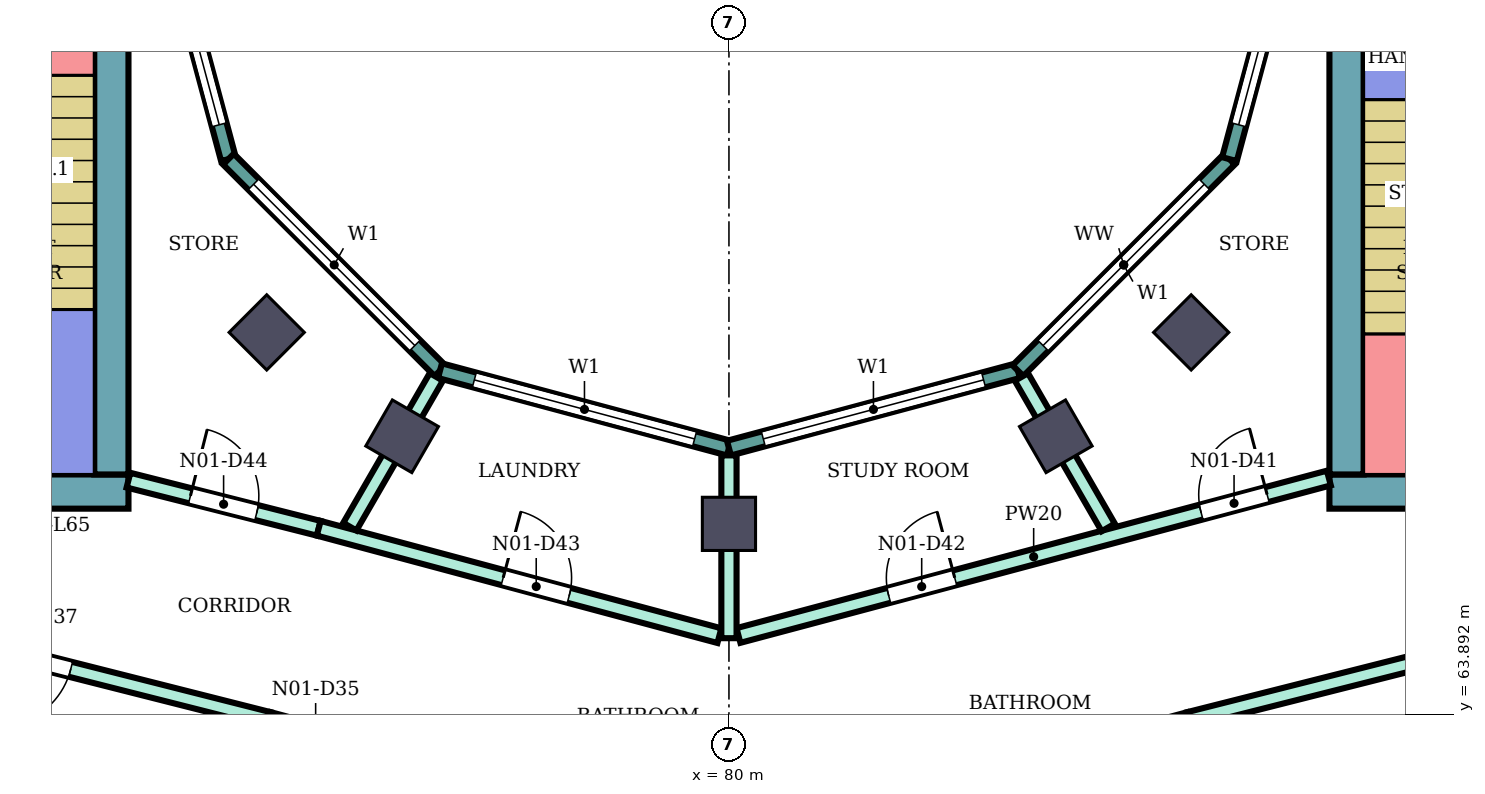
"""IFC4 building model, lengths in metres.
Left out: names, types, materials, properties, quantities, classifications, styles, units other than length and angle.
Written with IfcOpenShell. Run it as: python <this file> out.ifc"""

import sys

from ifc_helpers import new_model, si_unit, direction, frame, frame_2d, origin, origin_2d, place, context, subcontext, project, spatial, rectangle, extrude, element, fill, save


model = new_model("IFC4")
c1 = context("Model", 3, precision=1e-05, world=origin(), true_north=direction((0.0, 1.0)))
c2 = subcontext(c1, "Body", "Model", "MODEL_VIEW")
j1 = project(units=[si_unit("LENGTHUNIT", "METRE"), si_unit("PLANEANGLEUNIT", "RADIAN")], contexts=[c1])
p1 = place(None, origin())
s1 = spatial("IfcSite", under=j1, at=p1, CompositionType="ELEMENT")
p2 = place(p1, origin())
s2 = spatial("IfcBuilding", under=s1, at=p2, CompositionType="ELEMENT")
p3 = place(p2, frame((0.0, 0.0, 284.1)))
s3 = spatial("IfcBuildingStorey", under=s2, at=p3, CompositionType="ELEMENT", Elevation=284.1)
for number, where, z_axis, x_axis in (
    (1, (73.919, 68.919, 0.0), (0.0, 0.0, 1.0), (-0.707, -0.707, 0.0)),
    (2, (75.7, 67.552, 0.0), (0.0, 0.0, 1.0), (-0.5, -0.866, 0.0)),
    (3, (80.0, 66.4, 0.0), (0.0, 0.0, 1.0), (0.0, -1.0, 0.0)),
    (4, (84.3, 67.552, 0.0), (0.0, 0.0, 1.0), (0.5, -0.866, 0.0)),
    (5, (86.081, 68.919, 0.0), (0.0, 0.0, 1.0), (0.707, -0.707, 0.0)),
):
    element("IfcColumn", number, at=place(p3, frame(where, z_axis=z_axis, x_axis=x_axis)), inside=s3, PredefinedType="COLUMN", context=c2, shape_type="SweptSolid", body=[
        extrude(rectangle(XDim=0.7, YDim=0.7, at=origin_2d()), origin(), (0.0, 0.0, 1.0), 4.2),
    ])
p4 = place(p3, frame((87.9, 66.825, 0.0), z_axis=(0.0, 0.0, 1.0), x_axis=(1.0, 0.0, 0.0)))
e6 = element("IfcWall", 6, at=p4, inside=s3, PredefinedType="SHEAR", context=c2, shape_type="SweptSolid", body=[
    extrude(rectangle(XDim=13.55, YDim=0.45, at=frame_2d((6.775, 0.0))), origin(), (0.0, 0.0, 1.0), 3.88),
])
p5 = place(p4, frame((4.2, 0.0, 0.0)))
e7 = element("IfcOpeningElement", 7, at=p5, cuts=e6, PredefinedType="OPENING", context=c2, shape_type="SweptSolid", body=[
    extrude(rectangle(XDim=2.4, YDim=2.4, at=frame_2d((1.2, 1.2))), frame((0.0, 0.235, 0.0), z_axis=(0.0, -1.0, 0.0), x_axis=(1.0, 0.0, 0.0)), (0.0, 0.0, 1.0), 0.47),
])
p6 = place(p3, frame((88.125, 67.05, 0.0), z_axis=(0.0, 0.0, 1.0), x_axis=(0.0, 1.0, 0.0)))
e8 = element("IfcWall", 8, at=p6, inside=s3, PredefinedType="SHEAR", context=c2, shape_type="SweptSolid", body=[
    extrude(rectangle(XDim=7.95, YDim=0.45, at=frame_2d((3.975, 0.0))), origin(), (0.0, 0.0, 1.0), 3.88),
])
p7 = place(p3, frame((72.1, 66.825, 0.0), z_axis=(0.0, 0.0, 1.0), x_axis=(-1.0, 0.0, 0.0)))
e9 = element("IfcWall", 9, at=p7, inside=s3, PredefinedType="SHEAR", context=c2, shape_type="SweptSolid", body=[
    extrude(rectangle(XDim=13.55, YDim=0.45, at=frame_2d((6.775, 0.0))), origin(), (0.0, 0.0, 1.0), 3.88),
])
p8 = place(p7, frame((4.2, 0.0, 0.0)))
e10 = element("IfcOpeningElement", 10, at=p8, cuts=e9, PredefinedType="OPENING", context=c2, shape_type="SweptSolid", body=[
    extrude(rectangle(XDim=2.4, YDim=2.4, at=frame_2d((1.2, 1.2))), frame((0.0, 0.235, 0.0), z_axis=(0.0, -1.0, 0.0), x_axis=(1.0, 0.0, 0.0)), (0.0, 0.0, 1.0), 0.47),
])
p9 = place(p3, frame((71.875, 75.0, 0.0), z_axis=(0.0, 0.0, 1.0), x_axis=(0.0, -1.0, 0.0)))
e11 = element("IfcWall", 11, at=p9, inside=s3, PredefinedType="SHEAR", context=c2, shape_type="SweptSolid", body=[
    extrude(rectangle(XDim=7.95, YDim=0.45, at=frame_2d((3.975, 0.0))), origin(), (0.0, 0.0, 1.0), 3.88),
])
p10 = place(p3, frame((72.396, 75.0, 0.0), z_axis=(0.0, 0.0, 1.0), x_axis=(0.258789828301, -0.965933654434, 0.0)))
e12 = element("IfcWall", 12, at=p10, inside=s3, PredefinedType="NOTDEFINED", context=c2, shape_type="SweptSolid", body=[
    extrude(rectangle(XDim=3.936, YDim=0.2, at=frame_2d((1.968, 0.0))), origin(), (0.0, 0.0, 1.0), 4.2),
])
p11 = place(p10, frame((0.468, 0.0, 0.9)))
e13 = element("IfcOpeningElement", 13, at=p11, cuts=e12, PredefinedType="OPENING", context=c2, shape_type="SweptSolid", body=[
    extrude(rectangle(XDim=3.0, YDim=2.3, at=frame_2d((1.5, 1.15))), frame((0.0, 0.11, 0.0), z_axis=(0.0, -1.0, 0.0), x_axis=(1.0, 0.0, 0.0)), (0.0, 0.0, 1.0), 0.22),
])
p12 = place(p3, frame((73.415, 71.198, 0.0), z_axis=(0.0, 0.0, 1.0), x_axis=(0.707106781187, -0.707106781187, 0.0)))
e14 = element("IfcWall", 14, at=p12, inside=s3, PredefinedType="NOTDEFINED", context=c2, shape_type="SweptSolid", body=[
    extrude(rectangle(XDim=3.936, YDim=0.2, at=frame_2d((1.968, 0.0))), origin(), (0.0, 0.0, 1.0), 4.2),
])
p13 = place(p12, frame((0.468, 0.0, 0.9)))
e15 = element("IfcOpeningElement", 15, at=p13, cuts=e14, PredefinedType="OPENING", context=c2, shape_type="SweptSolid", body=[
    extrude(rectangle(XDim=3.0, YDim=2.3, at=frame_2d((1.5, 1.15))), frame((0.0, 0.11, 0.0), z_axis=(0.0, -1.0, 0.0), x_axis=(1.0, 0.0, 0.0)), (0.0, 0.0, 1.0), 0.22),
])
p14 = place(p3, frame((76.198, 68.415, 0.0), z_axis=(0.0, 0.0, 1.0), x_axis=(0.965933654434, -0.258789828301, 0.0)))
e16 = element("IfcWall", 16, at=p14, inside=s3, PredefinedType="NOTDEFINED", context=c2, shape_type="SweptSolid", body=[
    extrude(rectangle(XDim=3.936, YDim=0.2, at=frame_2d((1.968, 0.0))), origin(), (0.0, 0.0, 1.0), 4.2),
])
p15 = place(p14, frame((0.468, 0.0, 0.9)))
e17 = element("IfcOpeningElement", 17, at=p15, cuts=e16, PredefinedType="OPENING", context=c2, shape_type="SweptSolid", body=[
    extrude(rectangle(XDim=3.0, YDim=2.3, at=frame_2d((1.5, 1.15))), frame((0.0, 0.11, 0.0), z_axis=(0.0, -1.0, 0.0), x_axis=(1.0, 0.0, 0.0)), (0.0, 0.0, 1.0), 0.22),
])
p16 = place(p3, frame((80.0, 67.396, 0.0), z_axis=(0.0, 0.0, 1.0), x_axis=(0.965933654434, 0.258789828301, 0.0)))
e18 = element("IfcWall", 18, at=p16, inside=s3, PredefinedType="NOTDEFINED", context=c2, shape_type="SweptSolid", body=[
    extrude(rectangle(XDim=3.936, YDim=0.2, at=frame_2d((1.968, 0.0))), origin(), (0.0, 0.0, 1.0), 4.2),
])
p17 = place(p16, frame((0.468, 0.0, 0.9)))
e19 = element("IfcOpeningElement", 19, at=p17, cuts=e18, PredefinedType="OPENING", context=c2, shape_type="SweptSolid", body=[
    extrude(rectangle(XDim=3.0, YDim=2.3, at=frame_2d((1.5, 1.15))), frame((0.0, 0.11, 0.0), z_axis=(0.0, -1.0, 0.0), x_axis=(1.0, 0.0, 0.0)), (0.0, 0.0, 1.0), 0.22),
])
p18 = place(p3, frame((83.802, 68.415, 0.0), z_axis=(0.0, 0.0, 1.0), x_axis=(0.707106781187, 0.707106781187, 0.0)))
e20 = element("IfcWall", 20, at=p18, inside=s3, PredefinedType="NOTDEFINED", context=c2, shape_type="SweptSolid", body=[
    extrude(rectangle(XDim=3.936, YDim=0.2, at=frame_2d((1.968, 0.0))), origin(), (0.0, 0.0, 1.0), 4.2),
])
p19 = place(p18, frame((0.468, 0.0, 0.9)))
e21 = element("IfcOpeningElement", 21, at=p19, cuts=e20, PredefinedType="OPENING", context=c2, shape_type="SweptSolid", body=[
    extrude(rectangle(XDim=3.0, YDim=2.3, at=frame_2d((1.5, 1.15))), frame((0.0, 0.11, 0.0), z_axis=(0.0, -1.0, 0.0), x_axis=(1.0, 0.0, 0.0)), (0.0, 0.0, 1.0), 0.22),
])
p20 = place(p3, frame((86.585, 71.198, 0.0), z_axis=(0.0, 0.0, 1.0), x_axis=(0.258789828301, 0.965933654434, 0.0)))
e22 = element("IfcWall", 22, at=p20, inside=s3, PredefinedType="NOTDEFINED", context=c2, shape_type="SweptSolid", body=[
    extrude(rectangle(XDim=3.936, YDim=0.2, at=frame_2d((1.968, 0.0))), origin(), (0.0, 0.0, 1.0), 4.2),
])
p21 = place(p20, frame((0.468, 0.0, 0.9)))
e23 = element("IfcOpeningElement", 23, at=p21, cuts=e22, PredefinedType="OPENING", context=c2, shape_type="SweptSolid", body=[
    extrude(rectangle(XDim=3.0, YDim=2.3, at=frame_2d((1.5, 1.15))), frame((0.0, 0.11, 0.0), z_axis=(0.0, -1.0, 0.0), x_axis=(1.0, 0.0, 0.0)), (0.0, 0.0, 1.0), 0.22),
])
p22 = place(p3, frame((68.2, 65.28, 0.0), z_axis=(0.0, 0.0, 1.0), x_axis=(0.969440802773, -0.24532535523, 0.0)))
e24 = element("IfcWall", 24, at=p22, inside=s3, PredefinedType="PARTITIONING", context=c2, shape_type="SweptSolid", body=[
    extrude(rectangle(XDim=5.928, YDim=0.2, at=frame_2d((2.964, 0.0))), origin(), (0.0, 0.0, 1.0), 3.75),
])
p23 = place(p22, frame((2.239, 0.0, 0.0)))
e25 = element("IfcOpeningElement", 25, at=p23, cuts=e24, PredefinedType="OPENING", context=c2, shape_type="SweptSolid", body=[
    extrude(rectangle(XDim=1.0, YDim=2.1, at=frame_2d((0.5, 1.05))), frame((0.0, 0.11, 0.0), z_axis=(0.0, -1.0, 0.0), x_axis=(1.0, 0.0, 0.0)), (0.0, 0.0, 1.0), 0.22),
])
p24 = place(p3, frame((72.1, 66.975, 0.0), z_axis=(0.0, 0.0, 1.0), x_axis=(0.969471314457, -0.245204752086, 0.0)))
e26 = element("IfcWall", 26, at=p24, inside=s3, PredefinedType="PARTITIONING", context=c2, shape_type="SweptSolid", body=[
    extrude(rectangle(XDim=2.582, YDim=0.2, at=frame_2d((1.291, 0.0))), origin(), (0.0, 0.0, 1.0), 3.75),
])
p25 = place(p24, frame((0.841, 0.0, 0.0)))
e27 = element("IfcOpeningElement", 27, at=p25, cuts=e26, PredefinedType="OPENING", context=c2, shape_type="SweptSolid", body=[
    extrude(rectangle(XDim=0.9, YDim=2.1, at=frame_2d((0.45, 1.05))), frame((0.0, 0.11, 0.0), z_axis=(0.0, -1.0, 0.0), x_axis=(1.0, 0.0, 0.0)), (0.0, 0.0, 1.0), 0.22),
])
p26 = place(p3, frame((73.947, 63.826, 0.0), z_axis=(0.0, 0.0, 1.0), x_axis=(0.965872508768, -0.25901794688, 0.0)))
e28 = element("IfcWall", 28, at=p26, inside=s3, PredefinedType="PARTITIONING", context=c2, shape_type="SweptSolid", body=[
    extrude(rectangle(XDim=6.177, YDim=0.2, at=frame_2d((3.088, 0.0))), origin(), (0.0, 0.0, 1.0), 3.75),
])
p27 = place(p26, frame((4.885, 0.0, 0.0)))
e29 = element("IfcOpeningElement", 29, at=p27, cuts=e28, PredefinedType="OPENING", context=c2, shape_type="SweptSolid", body=[
    extrude(rectangle(XDim=1.0, YDim=2.1, at=frame_2d((0.5, 1.05))), frame((0.0, 0.11, 0.0), z_axis=(0.0, -1.0, 0.0), x_axis=(1.0, 0.0, 0.0)), (0.0, 0.0, 1.0), 0.22),
])
p28 = place(p26, frame((0.137, 0.0, 0.0)))
e30 = element("IfcOpeningElement", 30, at=p28, cuts=e28, PredefinedType="OPENING", context=c2, shape_type="SweptSolid", body=[
    extrude(rectangle(XDim=1.0, YDim=2.1, at=frame_2d((0.5, 1.05))), frame((0.0, 0.11, 0.0), z_axis=(0.0, -1.0, 0.0), x_axis=(1.0, 0.0, 0.0)), (0.0, 0.0, 1.0), 0.22),
])
p29 = place(p3, frame((74.603, 66.342, 0.0), z_axis=(0.0, 0.0, 1.0), x_axis=(0.965920893652, -0.258837453254, 0.0)))
e31 = element("IfcWall", 31, at=p29, inside=s3, PredefinedType="PARTITIONING", context=c2, shape_type="SweptSolid", body=[
    extrude(rectangle(XDim=5.458, YDim=0.2, at=frame_2d((2.729, 0.0))), origin(), (0.0, 0.0, 1.0), 3.75),
])
p30 = place(p29, frame((2.512, 0.0, 0.0)))
e32 = element("IfcOpeningElement", 32, at=p30, cuts=e31, PredefinedType="OPENING", context=c2, shape_type="SweptSolid", body=[
    extrude(rectangle(XDim=0.9, YDim=2.1, at=frame_2d((0.45, 1.05))), frame((0.0, 0.11, 0.0), z_axis=(0.0, -1.0, 0.0), x_axis=(1.0, 0.0, 0.0)), (0.0, 0.0, 1.0), 0.22),
])
p31 = place(p3, frame((75.012, 66.363, 0.0), z_axis=(0.0, 0.0, 1.0), x_axis=(0.500097042406, 0.865969369075, 0.0)))
e33 = element("IfcWall", 33, at=p31, inside=s3, PredefinedType="PARTITIONING", context=c2, shape_type="SweptSolid", body=[
    extrude(rectangle(XDim=2.275, YDim=0.2, at=frame_2d((1.138, 0.0))), origin(), (0.0, 0.0, 1.0), 3.75),
])
p32 = place(p3, frame((80.125, 64.932, 0.0), z_axis=(0.0, 0.0, 1.0), x_axis=(0.966236955806, 0.257655089674, 0.0)))
e34 = element("IfcWall", 34, at=p32, inside=s3, PredefinedType="PARTITIONING", context=c2, shape_type="SweptSolid", body=[
    extrude(rectangle(XDim=8.039, YDim=0.2, at=frame_2d((4.02, 0.0))), origin(), (0.0, 0.0, 1.0), 3.75),
])
p33 = place(p32, frame((6.298, 0.0, 0.0)))
e35 = element("IfcOpeningElement", 35, at=p33, cuts=e34, PredefinedType="OPENING", context=c2, shape_type="SweptSolid", body=[
    extrude(rectangle(XDim=0.9, YDim=2.1, at=frame_2d((0.45, 1.05))), frame((0.0, 0.11, 0.0), z_axis=(0.0, -1.0, 0.0), x_axis=(1.0, 0.0, 0.0)), (0.0, 0.0, 1.0), 0.22),
])
p34 = place(p32, frame((2.045, 0.0, 0.0)))
e36 = element("IfcOpeningElement", 36, at=p34, cuts=e34, PredefinedType="OPENING", context=c2, shape_type="SweptSolid", body=[
    extrude(rectangle(XDim=0.9, YDim=2.1, at=frame_2d((0.45, 1.05))), frame((0.0, 0.11, 0.0), z_axis=(0.0, -1.0, 0.0), x_axis=(1.0, 0.0, 0.0)), (0.0, 0.0, 1.0), 0.22),
])
p35 = place(p3, frame((80.0, 62.204, 0.0), z_axis=(0.0, 0.0, 1.0), x_axis=(0.965960221635, 0.258690645788, 0.0)))
e37 = element("IfcWall", 37, at=p35, inside=s3, PredefinedType="PARTITIONING", context=c2, shape_type="SweptSolid", body=[
    extrude(rectangle(XDim=6.267, YDim=0.2, at=frame_2d((3.133, 0.0))), origin(), (0.0, 0.0, 1.0), 3.75),
])
p36 = place(p35, frame((0.382, 0.0, 0.0)))
e38 = element("IfcOpeningElement", 38, at=p36, cuts=e37, PredefinedType="OPENING", context=c2, shape_type="SweptSolid", body=[
    extrude(rectangle(XDim=1.0, YDim=2.1, at=frame_2d((0.5, 1.05))), frame((0.0, 0.11, 0.0), z_axis=(0.0, -1.0, 0.0), x_axis=(1.0, 0.0, 0.0)), (0.0, 0.0, 1.0), 0.22),
])
p37 = place(p3, frame((80.0, 64.896, 0.0), z_axis=(0.0, 0.0, 1.0), x_axis=(0.0, 1.0, 0.0)))
e39 = element("IfcWall", 39, at=p37, inside=s3, PredefinedType="PARTITIONING", context=c2, shape_type="SweptSolid", body=[
    extrude(rectangle(XDim=2.405, YDim=0.2, at=frame_2d((1.203, 0.0))), origin(), (0.0, 0.0, 1.0), 3.75),
])
p38 = place(p3, frame((83.848, 68.332, 0.0), z_axis=(0.0, 0.0, 1.0), x_axis=(0.499953638813, -0.866052168773, 0.0)))
e40 = element("IfcWall", 40, at=p38, inside=s3, PredefinedType="PARTITIONING", context=c2, shape_type="SweptSolid", body=[
    extrude(rectangle(XDim=2.285, YDim=0.2, at=frame_2d((1.143, 0.0))), origin(), (0.0, 0.0, 1.0), 3.75),
])
p39 = place(p3, frame((86.053, 63.826, 0.0), z_axis=(0.0, 0.0, 1.0), x_axis=(0.969490004987, 0.245130843083, 0.0)))
e41 = element("IfcWall", 41, at=p39, inside=s3, PredefinedType="PARTITIONING", context=c2, shape_type="SweptSolid", body=[
    extrude(rectangle(XDim=5.908, YDim=0.2, at=frame_2d((2.954, 0.0))), origin(), (0.0, 0.0, 1.0), 3.75),
])
p40 = place(p11, origin())
e42 = element("IfcWindow", 42, at=p40, inside=s3, PartitioningType="SINGLE_PANEL", PredefinedType="WINDOW", context=c2, shape_type="SweptSolid", body=[
    extrude(rectangle(XDim=3.0, YDim=2.3, at=frame_2d((1.5, 1.15))), frame((0.0, 0.03, 0.0), z_axis=(0.0, -1.0, 0.0), x_axis=(1.0, 0.0, 0.0)), (0.0, 0.0, 1.0), 0.06),
])
fill(e13, e42)
p41 = place(p13, origin())
e43 = element("IfcWindow", 43, at=p41, inside=s3, PartitioningType="SINGLE_PANEL", PredefinedType="WINDOW", context=c2, shape_type="SweptSolid", body=[
    extrude(rectangle(XDim=3.0, YDim=2.3, at=frame_2d((1.5, 1.15))), frame((0.0, 0.03, 0.0), z_axis=(0.0, -1.0, 0.0), x_axis=(1.0, 0.0, 0.0)), (0.0, 0.0, 1.0), 0.06),
])
fill(e15, e43)
p42 = place(p15, origin())
e44 = element("IfcWindow", 44, at=p42, inside=s3, PartitioningType="SINGLE_PANEL", PredefinedType="WINDOW", context=c2, shape_type="SweptSolid", body=[
    extrude(rectangle(XDim=3.0, YDim=2.3, at=frame_2d((1.5, 1.15))), frame((0.0, 0.03, 0.0), z_axis=(0.0, -1.0, 0.0), x_axis=(1.0, 0.0, 0.0)), (0.0, 0.0, 1.0), 0.06),
])
fill(e17, e44)
p43 = place(p17, origin())
e45 = element("IfcWindow", 45, at=p43, inside=s3, PartitioningType="SINGLE_PANEL", PredefinedType="WINDOW", context=c2, shape_type="SweptSolid", body=[
    extrude(rectangle(XDim=3.0, YDim=2.3, at=frame_2d((1.5, 1.15))), frame((0.0, 0.03, 0.0), z_axis=(0.0, -1.0, 0.0), x_axis=(1.0, 0.0, 0.0)), (0.0, 0.0, 1.0), 0.06),
])
fill(e19, e45)
p44 = place(p19, origin())
e46 = element("IfcWindow", 46, at=p44, inside=s3, PartitioningType="SINGLE_PANEL", PredefinedType="WINDOW", context=c2, shape_type="SweptSolid", body=[
    extrude(rectangle(XDim=3.0, YDim=2.3, at=frame_2d((1.5, 1.15))), frame((0.0, 0.03, 0.0), z_axis=(0.0, -1.0, 0.0), x_axis=(1.0, 0.0, 0.0)), (0.0, 0.0, 1.0), 0.06),
])
fill(e21, e46)
p45 = place(p21, origin())
e47 = element("IfcWindow", 47, at=p45, inside=s3, PartitioningType="SINGLE_PANEL", PredefinedType="WINDOW", context=c2, shape_type="SweptSolid", body=[
    extrude(rectangle(XDim=3.0, YDim=2.3, at=frame_2d((1.5, 1.15))), frame((0.0, 0.03, 0.0), z_axis=(0.0, -1.0, 0.0), x_axis=(1.0, 0.0, 0.0)), (0.0, 0.0, 1.0), 0.06),
])
fill(e23, e47)
p46 = place(p23, frame((1.0, 0.0, 0.0), z_axis=(0.0, 0.0, 1.0), x_axis=(-1.0, 0.0, 0.0)))
e48 = element("IfcDoor", 48, at=p46, inside=s3, OperationType="SINGLE_SWING_RIGHT", PredefinedType="DOOR", context=c2, shape_type="SweptSolid", body=[
    extrude(rectangle(XDim=1.0, YDim=2.1, at=frame_2d((0.5, 1.05))), frame((0.0, 0.025, 0.0), z_axis=(0.0, -1.0, 0.0), x_axis=(1.0, 0.0, 0.0)), (0.0, 0.0, 1.0), 0.05),
])
fill(e25, e48)
p47 = place(p33, origin())
e49 = element("IfcDoor", 49, at=p47, inside=s3, OperationType="SINGLE_SWING_RIGHT", PredefinedType="DOOR", context=c2, shape_type="SweptSolid", body=[
    extrude(rectangle(XDim=0.9, YDim=2.1, at=frame_2d((0.45, 1.05))), frame((0.0, 0.025, 0.0), z_axis=(0.0, -1.0, 0.0), x_axis=(1.0, 0.0, 0.0)), (0.0, 0.0, 1.0), 0.05),
])
fill(e35, e49)
p48 = place(p34, origin())
e50 = element("IfcDoor", 50, at=p48, inside=s3, OperationType="SINGLE_SWING_RIGHT", PredefinedType="DOOR", context=c2, shape_type="SweptSolid", body=[
    extrude(rectangle(XDim=0.9, YDim=2.1, at=frame_2d((0.45, 1.05))), frame((0.0, 0.025, 0.0), z_axis=(0.0, -1.0, 0.0), x_axis=(1.0, 0.0, 0.0)), (0.0, 0.0, 1.0), 0.05),
])
fill(e36, e50)
p49 = place(p30, origin())
e51 = element("IfcDoor", 51, at=p49, inside=s3, OperationType="SINGLE_SWING_LEFT", PredefinedType="DOOR", context=c2, shape_type="SweptSolid", body=[
    extrude(rectangle(XDim=0.9, YDim=2.1, at=frame_2d((0.45, 1.05))), frame((0.0, 0.025, 0.0), z_axis=(0.0, -1.0, 0.0), x_axis=(1.0, 0.0, 0.0)), (0.0, 0.0, 1.0), 0.05),
])
fill(e32, e51)
p50 = place(p25, origin())
e52 = element("IfcDoor", 52, at=p50, inside=s3, OperationType="SINGLE_SWING_LEFT", PredefinedType="DOOR", context=c2, shape_type="SweptSolid", body=[
    extrude(rectangle(XDim=0.9, YDim=2.1, at=frame_2d((0.45, 1.05))), frame((0.0, 0.025, 0.0), z_axis=(0.0, -1.0, 0.0), x_axis=(1.0, 0.0, 0.0)), (0.0, 0.0, 1.0), 0.05),
])
fill(e27, e52)
save(model, sys.argv[1])
